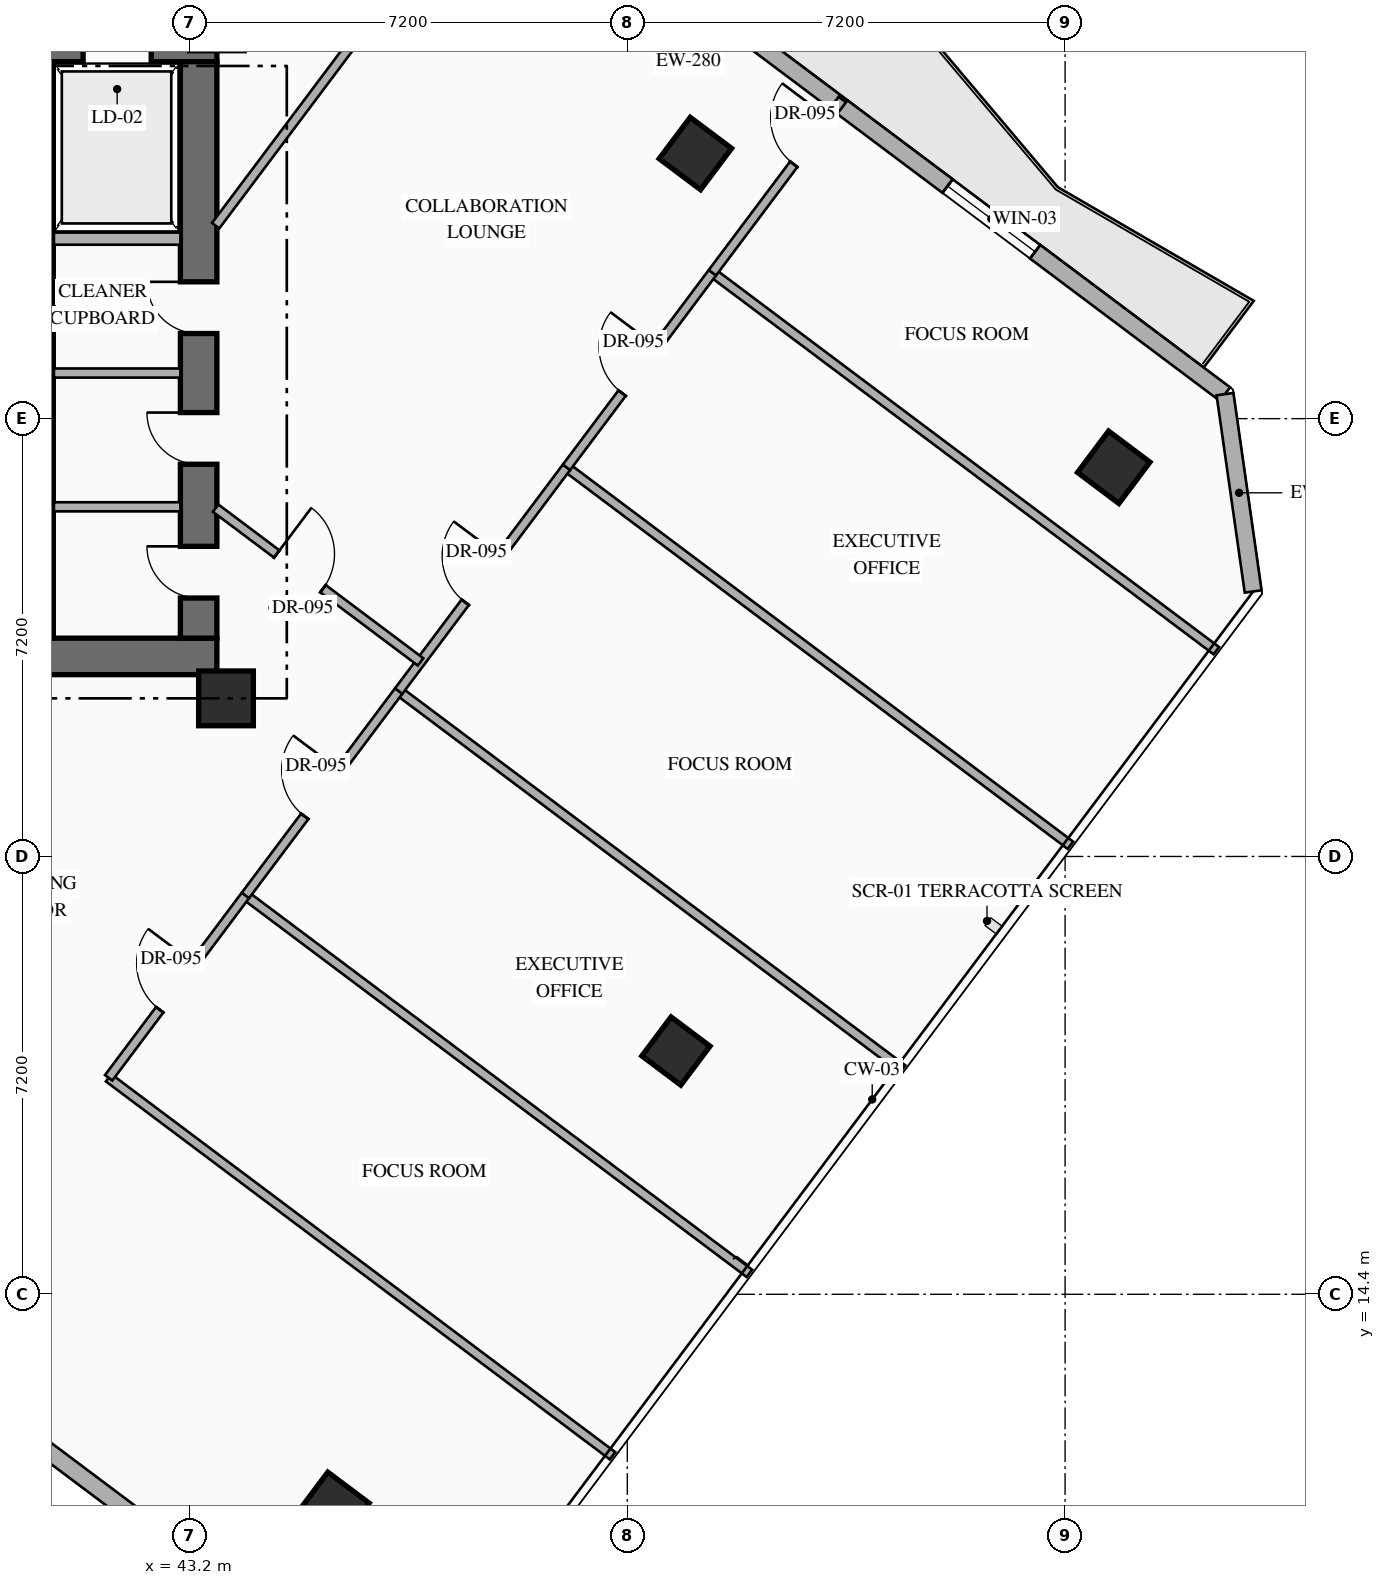
"""IFC4 building model, lengths in metres.
Left out: names, types, materials, properties, quantities, classifications, styles, units other than length and angle.
Written with IfcOpenShell. Run it as: python <this file> out.ifc"""

import sys

from ifc_helpers import new_model, si_unit, direction, frame, frame_2d, origin, origin_2d, place, context, subcontext, project, spatial, rectangle, hollow_rectangle, extrude, element, fill, save


model = new_model("IFC4")
c1 = context("Model", 3, precision=1e-05, world=origin(), true_north=direction((0.0, 1.0)))
c2 = subcontext(c1, "Body", "Model", "MODEL_VIEW")
j1 = project(units=[si_unit("LENGTHUNIT", "METRE"), si_unit("PLANEANGLEUNIT", "RADIAN")], contexts=[c1])
p1 = place(None, origin())
s1 = spatial("IfcSite", under=j1, at=p1, CompositionType="ELEMENT")
p2 = place(p1, origin())
s2 = spatial("IfcBuilding", under=s1, at=p2, CompositionType="ELEMENT")
p3 = place(p2, frame((0.0, 0.0, 149.25)))
s3 = spatial("IfcBuildingStorey", under=s2, at=p3, CompositionType="ELEMENT", Elevation=149.25)
p4 = place(p3, frame((35.89, 24.89, 0.0), z_axis=(0.0, 0.0, 1.0), x_axis=(1.0, 0.0, 0.0)))
e1 = element("IfcWall", 1, at=p4, inside=s3, PredefinedType="SHEAR", context=c2, shape_type="SweptSolid", body=[
    extrude(rectangle(XDim=7.76, YDim=0.6, at=frame_2d((3.88, 0.0))), origin(), (0.0, 0.0, 1.0), 3.6),
])
p5 = place(p3, frame((35.89, 34.97, 0.0), z_axis=(0.0, 0.0, 1.0), x_axis=(1.0, 0.0, 0.0)))
e2 = element("IfcWall", 2, at=p5, inside=s3, PredefinedType="SHEAR", context=c2, shape_type="SweptSolid", body=[
    extrude(rectangle(XDim=7.76, YDim=0.6, at=frame_2d((3.88, 0.0))), origin(), (0.0, 0.0, 1.0), 3.6),
])
p6 = place(p5, frame((2.66, 0.0, 0.0)))
e3 = element("IfcOpeningElement", 3, at=p6, cuts=e2, PredefinedType="OPENING", context=c2, shape_type="SweptSolid", body=[
    extrude(rectangle(XDim=1.1, YDim=2.2, at=frame_2d((0.55, 1.1))), frame((0.0, 0.31, 0.0), z_axis=(0.0, -1.0, 0.0), x_axis=(1.0, 0.0, 0.0)), (0.0, 0.0, 1.0), 0.62),
])
p7 = place(p5, frame((5.56, 0.0, 0.0)))
e4 = element("IfcOpeningElement", 4, at=p7, cuts=e2, PredefinedType="OPENING", context=c2, shape_type="SweptSolid", body=[
    extrude(rectangle(XDim=1.12, YDim=2.15, at=frame_2d((0.56, 1.075))), frame((0.0, 0.31, 0.0), z_axis=(0.0, -1.0, 0.0), x_axis=(1.0, 0.0, 0.0)), (0.0, 0.0, 1.0), 0.62),
])
p8 = place(p3, frame((43.35, 25.19, 0.0), z_axis=(0.0, 0.0, 1.0), x_axis=(0.0, 1.0, 0.0)))
e5 = element("IfcWall", 5, at=p8, inside=s3, PredefinedType="SHEAR", context=c2, shape_type="SweptSolid", body=[
    extrude(rectangle(XDim=9.48, YDim=0.6, at=frame_2d((4.74, 0.0))), origin(), (0.0, 0.0, 1.0), 3.6),
])
p9 = place(p8, frame((0.66, 0.0, 0.0)))
e6 = element("IfcOpeningElement", 6, at=p9, cuts=e5, PredefinedType="OPENING", context=c2, shape_type="SweptSolid", body=[
    extrude(rectangle(XDim=0.85, YDim=2.08, at=frame_2d((0.425, 1.04))), frame((0.0, 0.31, 0.0), z_axis=(0.0, -1.0, 0.0), x_axis=(1.0, 0.0, 0.0)), (0.0, 0.0, 1.0), 0.62),
])
p10 = place(p8, frame((2.86, 0.0, 0.0)))
e7 = element("IfcOpeningElement", 7, at=p10, cuts=e5, PredefinedType="OPENING", context=c2, shape_type="SweptSolid", body=[
    extrude(rectangle(XDim=0.85, YDim=2.08, at=frame_2d((0.425, 1.04))), frame((0.0, 0.31, 0.0), z_axis=(0.0, -1.0, 0.0), x_axis=(1.0, 0.0, 0.0)), (0.0, 0.0, 1.0), 0.62),
])
p11 = place(p8, frame((5.01, 0.0, 0.0)))
e8 = element("IfcOpeningElement", 8, at=p11, cuts=e5, PredefinedType="OPENING", context=c2, shape_type="SweptSolid", body=[
    extrude(rectangle(XDim=0.85, YDim=2.08, at=frame_2d((0.425, 1.04))), frame((0.0, 0.31, 0.0), z_axis=(0.0, -1.0, 0.0), x_axis=(1.0, 0.0, 0.0)), (0.0, 0.0, 1.0), 0.62),
])
p12 = place(p3, frame((40.81, 25.19, 0.0), z_axis=(0.0, 0.0, 1.0), x_axis=(0.0, 1.0, 0.0)))
e9 = element("IfcWall", 9, at=p12, inside=s3, PredefinedType="SHEAR", context=c2, shape_type="SweptSolid", body=[
    extrude(rectangle(XDim=9.48, YDim=0.3, at=frame_2d((4.74, 0.0))), origin(), (0.0, 0.0, 1.0), 3.6),
])
p13 = place(p3, frame((43.8, 24.2, 0.0), z_axis=(0.0, 0.0, 1.0), x_axis=(1.0, 0.0, 0.0)))
e10 = element("IfcColumn", 10, at=p13, inside=s3, PredefinedType="COLUMN", context=c2, shape_type="SweptSolid", body=[
    extrude(rectangle(XDim=0.9, YDim=0.9, at=origin_2d()), origin(), (0.0, 0.0, 1.0), 3.6),
])
for number, where, z_axis, x_axis in (
    (11, (51.52, 33.16, 0.0), (0.0, 0.0, 1.0), (0.8, -0.6, 0.0)),
    (12, (45.56, 10.88, 0.0), (0.0, 0.0, 1.0), (0.8, -0.6, 0.0)),
    (13, (58.4, 28.0, 0.0), (0.0, 0.0, 1.0), (0.8, -0.6, 0.0)),
):
    element("IfcColumn", number, at=place(p3, frame(where, z_axis=z_axis, x_axis=x_axis)), inside=s3, PredefinedType="COLUMN", context=c2, shape_type="SweptSolid", body=[
        extrude(hollow_rectangle(XDim=0.85, YDim=0.85, WallThickness=0.032, at=origin_2d()), origin(), (0.0, 0.0, 1.0), 3.6),
    ])
p14 = place(p3, frame((51.2, 18.4, 0.0), z_axis=(0.0, 0.0, 1.0), x_axis=(0.799999996291, -0.600000004945, 0.0)))
e14 = element("IfcColumn", 14, at=p14, inside=s3, PredefinedType="COLUMN", context=c2, shape_type="SweptSolid", body=[
    extrude(hollow_rectangle(XDim=0.8, YDim=0.8, WallThickness=0.032, at=origin_2d()), origin(), (0.0, 0.0, 1.0), 3.6),
])
p15 = place(p3, frame((44.86, 40.73, 0.0), z_axis=(0.0, 0.0, 1.0), x_axis=(0.800007624502, -0.599989833863, 0.0)))
e15 = element("IfcWall", 15, at=p15, inside=s3, PredefinedType="STANDARD", context=c2, shape_type="SweptSolid", body=[
    extrude(rectangle(XDim=19.212, YDim=0.28, at=frame_2d((9.606, 0.0))), origin(), (0.0, 0.0, 1.0), 3.35),
])
p16 = place(p15, frame((1.755, 0.0, 0.0)))
e16 = element("IfcOpeningElement", 16, at=p16, cuts=e15, PredefinedType="OPENING", context=c2, shape_type="SweptSolid", body=[
    extrude(rectangle(XDim=1.1, YDim=2.2, at=frame_2d((0.55, 1.1))), frame((0.0, 0.15, 0.0), z_axis=(0.0, -1.0, 0.0), x_axis=(1.0, 0.0, 0.0)), (0.0, 0.0, 1.0), 0.3),
])
p17 = place(p15, frame((13.509, 0.0, 0.85)))
e17 = element("IfcOpeningElement", 17, at=p17, cuts=e15, PredefinedType="OPENING", context=c2, shape_type="SweptSolid", body=[
    extrude(rectangle(XDim=1.8, YDim=2.1, at=frame_2d((0.9, 1.05))), frame((0.0, 0.15, 0.0), z_axis=(0.0, -1.0, 0.0), x_axis=(1.0, 0.0, 0.0)), (0.0, 0.0, 1.0), 0.3),
])
p18 = place(p3, frame((60.23, 29.203, 0.0), z_axis=(0.0, 0.0, 1.0), x_axis=(0.141296221922, -0.989967361922, 0.0)))
e18 = element("IfcWall", 18, at=p18, inside=s3, PredefinedType="STANDARD", context=c2, shape_type="SweptSolid", body=[
    extrude(rectangle(XDim=3.278, YDim=0.28, at=frame_2d((1.639, 0.0))), origin(), (0.0, 0.0, 1.0), 3.35),
])
p19 = place(p3, frame((44.918, 8.787, 0.0), z_axis=(0.0, 0.0, 1.0), x_axis=(-0.800004765927, 0.599993645378, 0.0)))
e19 = element("IfcWall", 19, at=p19, inside=s3, PredefinedType="STANDARD", context=c2, shape_type="SweptSolid", body=[
    extrude(rectangle(XDim=24.588, YDim=0.28, at=frame_2d((12.294, 0.0))), origin(), (0.0, 0.0, 1.0), 3.35),
])
p20 = place(p3, frame((40.97, 31.76, 0.0), z_axis=(0.0, 0.0, 1.0), x_axis=(1.0, 0.0, 0.0)))
e20 = element("IfcWall", 20, at=p20, inside=s3, PredefinedType="STANDARD", context=c2, shape_type="SweptSolid", body=[
    extrude(rectangle(XDim=2.08, YDim=0.2, at=frame_2d((1.04, 0.0))), origin(), (0.0, 0.0, 1.0), 3.35),
])
for number, where, z_axis, x_axis in (
    (21, (40.97, 27.35, 0.0), (0.0, 0.0, 1.0), (1.0, 0.0, 0.0)),
    (22, (40.97, 29.55, 0.0), (0.0, 0.0, 1.0), (1.0, 0.0, 0.0)),
):
    element("IfcWall", number, at=place(p3, frame(where, z_axis=z_axis, x_axis=x_axis)), inside=s3, PredefinedType="PARTITIONING", context=c2, shape_type="SweptSolid", body=[
        extrude(rectangle(XDim=2.08, YDim=0.15, at=frame_2d((1.04, 0.0))), origin(), (0.0, 0.0, 1.0), 3.35),
    ])
for number, where, z_axis, x_axis in (
    (23, (41.87, 17.96, 0.0), (0.0, 0.0, 1.0), (0.8, -0.6, 0.0)),
    (24, (44.12, 20.96, 0.0), (0.0, 0.0, 1.0), (0.8, -0.6, 0.0)),
):
    element("IfcWall", number, at=place(p3, frame(where, z_axis=z_axis, x_axis=x_axis)), inside=s3, PredefinedType="PARTITIONING", context=c2, shape_type="SweptSolid", body=[
        extrude(rectangle(XDim=10.36, YDim=0.15, at=frame_2d((5.18, 0.0))), origin(), (0.0, 0.0, 1.0), 3.35),
    ])
p21 = place(p3, frame((41.87, 17.96, 0.0), z_axis=(0.0, 0.0, 1.0), x_axis=(0.6, 0.8, 0.0)))
e25 = element("IfcWall", 25, at=p21, inside=s3, PredefinedType="PARTITIONING", context=c2, shape_type="SweptSolid", body=[
    extrude(rectangle(XDim=3.75, YDim=0.15, at=frame_2d((1.875, 0.0))), origin(), (0.0, 0.0, 1.0), 3.35),
])
p22 = place(p21, frame((1.4, 0.0, 0.0)))
e26 = element("IfcOpeningElement", 26, at=p22, cuts=e25, PredefinedType="OPENING", context=c2, shape_type="SweptSolid", body=[
    extrude(rectangle(XDim=0.95, YDim=2.15, at=frame_2d((0.475, 1.075))), frame((0.0, 0.085, 0.0), z_axis=(0.0, -1.0, 0.0), x_axis=(1.0, 0.0, 0.0)), (0.0, 0.0, 1.0), 0.17),
])
p23 = place(p3, frame((46.64, 24.32, 0.0), z_axis=(0.0, 0.0, 1.0), x_axis=(0.8, -0.6, 0.0)))
e27 = element("IfcWall", 27, at=p23, inside=s3, PredefinedType="PARTITIONING", context=c2, shape_type="SweptSolid", body=[
    extrude(rectangle(XDim=10.36, YDim=0.15, at=frame_2d((5.18, 0.0))), origin(), (0.0, 0.0, 1.0), 3.35),
])
p24 = place(p3, frame((44.12, 20.96, 0.0), z_axis=(0.0, 0.0, 1.0), x_axis=(0.59995349547, 0.800034876286, 0.0)))
e28 = element("IfcWall", 28, at=p24, inside=s3, PredefinedType="PARTITIONING", context=c2, shape_type="SweptSolid", body=[
    extrude(rectangle(XDim=4.2, YDim=0.15, at=frame_2d((2.1, 0.0))), origin(), (0.0, 0.0, 1.0), 3.35),
])
p25 = place(p24, frame((1.625, 0.0, 0.0)))
e29 = element("IfcOpeningElement", 29, at=p25, cuts=e28, PredefinedType="OPENING", context=c2, shape_type="SweptSolid", body=[
    extrude(rectangle(XDim=0.95, YDim=2.15, at=frame_2d((0.475, 1.075))), frame((0.0, 0.085, 0.0), z_axis=(0.0, -1.0, 0.0), x_axis=(1.0, 0.0, 0.0)), (0.0, 0.0, 1.0), 0.17),
])
p26 = place(p3, frame((49.4, 28.0, 0.0), z_axis=(0.0, 0.0, 1.0), x_axis=(0.8, -0.6, 0.0)))
e30 = element("IfcWall", 30, at=p26, inside=s3, PredefinedType="PARTITIONING", context=c2, shape_type="SweptSolid", body=[
    extrude(rectangle(XDim=10.36, YDim=0.15, at=frame_2d((5.18, 0.0))), origin(), (0.0, 0.0, 1.0), 3.35),
])
p27 = place(p3, frame((46.64, 24.32, 0.0), z_axis=(0.0, 0.0, 1.0), x_axis=(0.600008491904, 0.799993631001, 0.0)))
e31 = element("IfcWall", 31, at=p27, inside=s3, PredefinedType="PARTITIONING", context=c2, shape_type="SweptSolid", body=[
    extrude(rectangle(XDim=4.6, YDim=0.15, at=frame_2d((2.3, 0.0))), origin(), (0.0, 0.0, 1.0), 3.35),
])
p28 = place(p27, frame((1.825, 0.0, 0.0)))
e32 = element("IfcOpeningElement", 32, at=p28, cuts=e31, PredefinedType="OPENING", context=c2, shape_type="SweptSolid", body=[
    extrude(rectangle(XDim=0.95, YDim=2.15, at=frame_2d((0.475, 1.075))), frame((0.0, 0.085, 0.0), z_axis=(0.0, -1.0, 0.0), x_axis=(1.0, 0.0, 0.0)), (0.0, 0.0, 1.0), 0.17),
])
p29 = place(p3, frame((51.8, 31.2, 0.0), z_axis=(0.0, 0.0, 1.0), x_axis=(0.799991516197, -0.600011311571, 0.0)))
e33 = element("IfcWall", 33, at=p29, inside=s3, PredefinedType="PARTITIONING", context=c2, shape_type="SweptSolid", body=[
    extrude(rectangle(XDim=10.36, YDim=0.15, at=frame_2d((5.18, 0.0))), origin(), (0.0, 0.0, 1.0), 3.35),
])
p30 = place(p3, frame((49.4, 28.0, 0.0), z_axis=(0.0, 0.0, 1.0), x_axis=(0.600029296115, 0.799978027076, 0.0)))
e34 = element("IfcWall", 34, at=p30, inside=s3, PredefinedType="PARTITIONING", context=c2, shape_type="SweptSolid", body=[
    extrude(rectangle(XDim=4.0, YDim=0.15, at=frame_2d((2.0, 0.0))), origin(), (0.0, 0.0, 1.0), 3.35),
])
p31 = place(p30, frame((1.525, 0.0, 0.0)))
e35 = element("IfcOpeningElement", 35, at=p31, cuts=e34, PredefinedType="OPENING", context=c2, shape_type="SweptSolid", body=[
    extrude(rectangle(XDim=0.95, YDim=2.15, at=frame_2d((0.475, 1.075))), frame((0.0, 0.085, 0.0), z_axis=(0.0, -1.0, 0.0), x_axis=(1.0, 0.0, 0.0)), (0.0, 0.0, 1.0), 0.17),
])
p32 = place(p3, frame((51.8, 31.2, 0.0), z_axis=(0.0, 0.0, 1.0), x_axis=(0.599978055212, 0.800016458121, 0.0)))
e36 = element("IfcWall", 36, at=p32, inside=s3, PredefinedType="PARTITIONING", context=c2, shape_type="SweptSolid", body=[
    extrude(rectangle(XDim=3.56, YDim=0.15, at=frame_2d((1.78, 0.0))), origin(), (0.0, 0.0, 1.0), 3.35),
])
p33 = place(p32, frame((2.23, 0.0, 0.0)))
e37 = element("IfcOpeningElement", 37, at=p33, cuts=e36, PredefinedType="OPENING", context=c2, shape_type="SweptSolid", body=[
    extrude(rectangle(XDim=0.95, YDim=2.15, at=frame_2d((0.475, 1.075))), frame((0.0, 0.085, 0.0), z_axis=(0.0, -1.0, 0.0), x_axis=(1.0, 0.0, 0.0)), (0.0, 0.0, 1.0), 0.17),
])
p34 = place(p3, frame((43.63, 27.328, 0.0), z_axis=(0.0, 0.0, 1.0), x_axis=(0.799972182084, -0.600037088764, 0.0)))
e38 = element("IfcWall", 38, at=p34, inside=s3, PredefinedType="PARTITIONING", context=c2, shape_type="SweptSolid", body=[
    extrude(rectangle(XDim=4.213, YDim=0.15, at=frame_2d((2.106, 0.0))), origin(), (0.0, 0.0, 1.0), 3.045),
])
p35 = place(p34, frame((1.256, 0.0, 0.0)))
e39 = element("IfcOpeningElement", 39, at=p35, cuts=e38, PredefinedType="OPENING", context=c2, shape_type="SweptSolid", body=[
    extrude(rectangle(XDim=0.95, YDim=2.15, at=frame_2d((0.475, 1.075))), frame((0.0, 0.085, 0.0), z_axis=(0.0, -1.0, 0.0), x_axis=(1.0, 0.0, 0.0)), (0.0, 0.0, 1.0), 0.17),
])
p36 = place(p3, frame((43.63, 31.973, 0.0), z_axis=(0.0, 0.0, 1.0), x_axis=(0.599975099311, 0.800018674911, 0.0)))
e40 = element("IfcWall", 40, at=p36, inside=s3, PredefinedType="PARTITIONING", context=c2, shape_type="SweptSolid", body=[
    extrude(rectangle(XDim=7.844, YDim=0.15, at=frame_2d((3.922, 0.0))), origin(), (0.0, 0.0, 1.0), 3.35),
])
p37 = place(p17, origin())
e41 = element("IfcWindow", 41, at=p37, inside=s3, PartitioningType="SINGLE_PANEL", PredefinedType="WINDOW", context=c2, shape_type="SweptSolid", body=[
    extrude(rectangle(XDim=1.8, YDim=2.1, at=frame_2d((0.9, 1.05))), frame((0.0, 0.03, 0.0), z_axis=(0.0, -1.0, 0.0), x_axis=(1.0, 0.0, 0.0)), (0.0, 0.0, 1.0), 0.06),
])
fill(e17, e41)
p38 = place(p9, origin())
e42 = element("IfcDoor", 42, at=p38, inside=s3, OperationType="SINGLE_SWING_RIGHT", PredefinedType="DOOR", context=c2, shape_type="SweptSolid", body=[
    extrude(rectangle(XDim=0.85, YDim=2.08, at=frame_2d((0.425, 1.04))), frame((0.0, 0.025, 0.0), z_axis=(0.0, -1.0, 0.0), x_axis=(1.0, 0.0, 0.0)), (0.0, 0.0, 1.0), 0.05),
])
fill(e6, e42)
p39 = place(p10, origin())
e43 = element("IfcDoor", 43, at=p39, inside=s3, OperationType="SINGLE_SWING_RIGHT", PredefinedType="DOOR", context=c2, shape_type="SweptSolid", body=[
    extrude(rectangle(XDim=0.85, YDim=2.08, at=frame_2d((0.425, 1.04))), frame((0.0, 0.025, 0.0), z_axis=(0.0, -1.0, 0.0), x_axis=(1.0, 0.0, 0.0)), (0.0, 0.0, 1.0), 0.05),
])
fill(e7, e43)
p40 = place(p11, origin())
e44 = element("IfcDoor", 44, at=p40, inside=s3, OperationType="SINGLE_SWING_RIGHT", PredefinedType="DOOR", context=c2, shape_type="SweptSolid", body=[
    extrude(rectangle(XDim=0.85, YDim=2.08, at=frame_2d((0.425, 1.04))), frame((0.0, 0.025, 0.0), z_axis=(0.0, -1.0, 0.0), x_axis=(1.0, 0.0, 0.0)), (0.0, 0.0, 1.0), 0.05),
])
fill(e8, e44)
p41 = place(p22, origin())
e45 = element("IfcDoor", 45, at=p41, inside=s3, OperationType="SINGLE_SWING_RIGHT", PredefinedType="DOOR", context=c2, shape_type="SweptSolid", body=[
    extrude(rectangle(XDim=0.95, YDim=2.15, at=frame_2d((0.475, 1.075))), frame((0.0, 0.025, 0.0), z_axis=(0.0, -1.0, 0.0), x_axis=(1.0, 0.0, 0.0)), (0.0, 0.0, 1.0), 0.05),
])
fill(e26, e45)
p42 = place(p25, origin())
e46 = element("IfcDoor", 46, at=p42, inside=s3, OperationType="SINGLE_SWING_RIGHT", PredefinedType="DOOR", context=c2, shape_type="SweptSolid", body=[
    extrude(rectangle(XDim=0.95, YDim=2.15, at=frame_2d((0.475, 1.075))), frame((0.0, 0.025, 0.0), z_axis=(0.0, -1.0, 0.0), x_axis=(1.0, 0.0, 0.0)), (0.0, 0.0, 1.0), 0.05),
])
fill(e29, e46)
p43 = place(p28, origin())
e47 = element("IfcDoor", 47, at=p43, inside=s3, OperationType="SINGLE_SWING_RIGHT", PredefinedType="DOOR", context=c2, shape_type="SweptSolid", body=[
    extrude(rectangle(XDim=0.95, YDim=2.15, at=frame_2d((0.475, 1.075))), frame((0.0, 0.025, 0.0), z_axis=(0.0, -1.0, 0.0), x_axis=(1.0, 0.0, 0.0)), (0.0, 0.0, 1.0), 0.05),
])
fill(e32, e47)
p44 = place(p31, origin())
e48 = element("IfcDoor", 48, at=p44, inside=s3, OperationType="SINGLE_SWING_RIGHT", PredefinedType="DOOR", context=c2, shape_type="SweptSolid", body=[
    extrude(rectangle(XDim=0.95, YDim=2.15, at=frame_2d((0.475, 1.075))), frame((0.0, 0.025, 0.0), z_axis=(0.0, -1.0, 0.0), x_axis=(1.0, 0.0, 0.0)), (0.0, 0.0, 1.0), 0.05),
])
fill(e35, e48)
p45 = place(p33, origin())
e49 = element("IfcDoor", 49, at=p45, inside=s3, OperationType="SINGLE_SWING_RIGHT", PredefinedType="DOOR", context=c2, shape_type="SweptSolid", body=[
    extrude(rectangle(XDim=0.95, YDim=2.15, at=frame_2d((0.475, 1.075))), frame((0.0, 0.025, 0.0), z_axis=(0.0, -1.0, 0.0), x_axis=(1.0, 0.0, 0.0)), (0.0, 0.0, 1.0), 0.05),
])
fill(e37, e49)
p46 = place(p35, origin())
e50 = element("IfcDoor", 50, at=p46, inside=s3, OperationType="SINGLE_SWING_LEFT", PredefinedType="DOOR", context=c2, shape_type="SweptSolid", body=[
    extrude(rectangle(XDim=0.95, YDim=2.15, at=frame_2d((0.475, 1.075))), frame((0.0, 0.025, 0.0), z_axis=(0.0, -1.0, 0.0), x_axis=(1.0, 0.0, 0.0)), (0.0, 0.0, 1.0), 0.05),
])
fill(e39, e50)
save(model, sys.argv[1])
